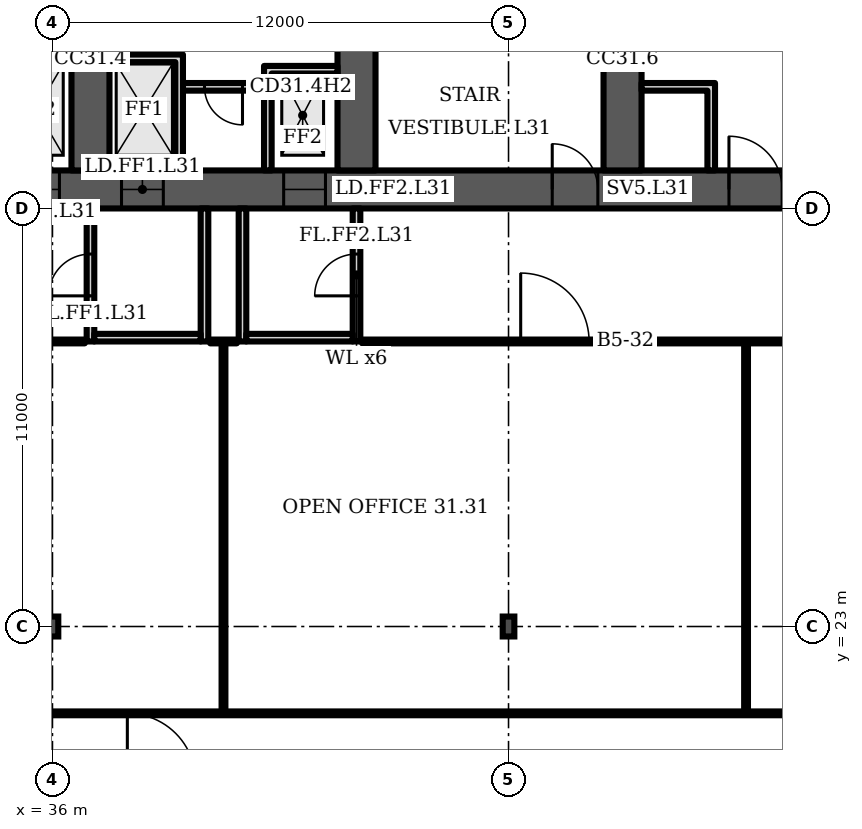
"""IFC4 building model, lengths in metres.
Left out: names, types, materials, properties, quantities, classifications, styles, units other than length and angle.
Written with IfcOpenShell. Run it as: python <this file> out.ifc"""

import sys

from ifc_helpers import new_model, si_unit, direction, frame, frame_2d, origin, origin_2d, place, context, subcontext, project, spatial, polyline, rectangle, i_section, outline, extrude, element, fill, save


model = new_model("IFC4")
c1 = context("Model", 3, precision=1e-05, world=origin(), true_north=direction((0.0, 1.0)))
c2 = subcontext(c1, "Body", "Model", "MODEL_VIEW")
j1 = project(units=[si_unit("LENGTHUNIT", "METRE"), si_unit("PLANEANGLEUNIT", "RADIAN")], contexts=[c1])
p1 = place(None, origin())
s1 = spatial("IfcSite", under=j1, at=p1, CompositionType="ELEMENT")
p2 = place(p1, origin())
s2 = spatial("IfcBuilding", under=s1, at=p2, CompositionType="ELEMENT")
p3 = place(p2, frame((0.0, 0.0, 132.7)))
s3 = spatial("IfcBuildingStorey", under=s2, at=p3, CompositionType="ELEMENT", Elevation=132.7)
p4 = place(p3, frame((16.0, 34.5, 0.0), z_axis=(0.0, 0.0, 1.0), x_axis=(1.0, 0.0, 0.0)))
e1 = element("IfcWall", 1, at=p4, inside=s3, PredefinedType="SHEAR", context=c2, shape_type="SweptSolid", body=[
    extrude(rectangle(XDim=49.0, YDim=1.0, at=frame_2d((24.5, 0.0))), origin(), (0.0, 0.0, 1.0), 3.6),
])
p5 = place(p4, frame((1.2, 0.0, 0.0)))
e2 = element("IfcOpeningElement", 2, at=p5, cuts=e1, PredefinedType="OPENING", context=c2, shape_type="SweptSolid", body=[
    extrude(rectangle(XDim=1.1, YDim=2.1, at=frame_2d((0.55, 1.05))), frame((0.0, 0.51, 0.0), z_axis=(0.0, -1.0, 0.0), x_axis=(1.0, 0.0, 0.0)), (0.0, 0.0, 1.0), 1.02),
])
p6 = place(p4, frame((5.083, 0.0, 0.0)))
e3 = element("IfcOpeningElement", 3, at=p6, cuts=e1, PredefinedType="OPENING", context=c2, shape_type="SweptSolid", body=[
    extrude(rectangle(XDim=1.1, YDim=2.1, at=frame_2d((0.55, 1.05))), frame((0.0, 0.51, 0.0), z_axis=(0.0, -1.0, 0.0), x_axis=(1.0, 0.0, 0.0)), (0.0, 0.0, 1.0), 1.02),
])
p7 = place(p4, frame((2.933, 0.0, 0.0)))
e4 = element("IfcOpeningElement", 4, at=p7, cuts=e1, PredefinedType="OPENING", context=c2, shape_type="SweptSolid", body=[
    extrude(rectangle(XDim=1.4, YDim=2.1, at=frame_2d((0.7, 1.05))), frame((0.0, 0.51, 0.0), z_axis=(0.0, -1.0, 0.0), x_axis=(1.0, 0.0, 0.0)), (0.0, 0.0, 1.0), 1.02),
])
p8 = place(p4, frame((7.65, 0.0, 0.0)))
e5 = element("IfcOpeningElement", 5, at=p8, cuts=e1, PredefinedType="OPENING", context=c2, shape_type="SweptSolid", body=[
    extrude(rectangle(XDim=1.2, YDim=2.1, at=frame_2d((0.6, 1.05))), frame((0.0, 0.51, 0.0), z_axis=(0.0, -1.0, 0.0), x_axis=(1.0, 0.0, 0.0)), (0.0, 0.0, 1.0), 1.02),
])
p9 = place(p4, frame((14.817, 0.0, 0.0)))
e6 = element("IfcOpeningElement", 6, at=p9, cuts=e1, PredefinedType="OPENING", context=c2, shape_type="SweptSolid", body=[
    extrude(rectangle(XDim=1.1, YDim=2.1, at=frame_2d((0.55, 1.05))), frame((0.0, 0.51, 0.0), z_axis=(0.0, -1.0, 0.0), x_axis=(1.0, 0.0, 0.0)), (0.0, 0.0, 1.0), 1.02),
])
p10 = place(p4, frame((19.083, 0.0, 0.0)))
e7 = element("IfcOpeningElement", 7, at=p10, cuts=e1, PredefinedType="OPENING", context=c2, shape_type="SweptSolid", body=[
    extrude(rectangle(XDim=1.1, YDim=2.1, at=frame_2d((0.55, 1.05))), frame((0.0, 0.51, 0.0), z_axis=(0.0, -1.0, 0.0), x_axis=(1.0, 0.0, 0.0)), (0.0, 0.0, 1.0), 1.02),
])
p11 = place(p4, frame((16.8, 0.0, 0.0)))
e8 = element("IfcOpeningElement", 8, at=p11, cuts=e1, PredefinedType="OPENING", context=c2, shape_type="SweptSolid", body=[
    extrude(rectangle(XDim=1.4, YDim=2.1, at=frame_2d((0.7, 1.05))), frame((0.0, 0.51, 0.0), z_axis=(0.0, -1.0, 0.0), x_axis=(1.0, 0.0, 0.0)), (0.0, 0.0, 1.0), 1.02),
])
p12 = place(p4, frame((21.817, 0.0, 0.0)))
e9 = element("IfcOpeningElement", 9, at=p12, cuts=e1, PredefinedType="OPENING", context=c2, shape_type="SweptSolid", body=[
    extrude(rectangle(XDim=1.1, YDim=2.1, at=frame_2d((0.55, 1.05))), frame((0.0, 0.51, 0.0), z_axis=(0.0, -1.0, 0.0), x_axis=(1.0, 0.0, 0.0)), (0.0, 0.0, 1.0), 1.02),
])
p13 = place(p4, frame((26.083, 0.0, 0.0)))
e10 = element("IfcOpeningElement", 10, at=p13, cuts=e1, PredefinedType="OPENING", context=c2, shape_type="SweptSolid", body=[
    extrude(rectangle(XDim=1.1, YDim=2.1, at=frame_2d((0.55, 1.05))), frame((0.0, 0.51, 0.0), z_axis=(0.0, -1.0, 0.0), x_axis=(1.0, 0.0, 0.0)), (0.0, 0.0, 1.0), 1.02),
])
p14 = place(p4, frame((33.15, 0.0, 0.0)))
e11 = element("IfcOpeningElement", 11, at=p14, cuts=e1, PredefinedType="OPENING", context=c2, shape_type="SweptSolid", body=[
    extrude(rectangle(XDim=1.2, YDim=2.1, at=frame_2d((0.6, 1.05))), frame((0.0, 0.51, 0.0), z_axis=(0.0, -1.0, 0.0), x_axis=(1.0, 0.0, 0.0)), (0.0, 0.0, 1.0), 1.02),
])
p15 = place(p4, frame((37.8, 0.0, 0.0)))
e12 = element("IfcOpeningElement", 12, at=p15, cuts=e1, PredefinedType="OPENING", context=c2, shape_type="SweptSolid", body=[
    extrude(rectangle(XDim=1.4, YDim=2.1, at=frame_2d((0.7, 1.05))), frame((0.0, 0.51, 0.0), z_axis=(0.0, -1.0, 0.0), x_axis=(1.0, 0.0, 0.0)), (0.0, 0.0, 1.0), 1.02),
])
p16 = place(p4, frame((42.817, 0.0, 0.0)))
e13 = element("IfcOpeningElement", 13, at=p16, cuts=e1, PredefinedType="OPENING", context=c2, shape_type="SweptSolid", body=[
    extrude(rectangle(XDim=1.1, YDim=2.1, at=frame_2d((0.55, 1.05))), frame((0.0, 0.51, 0.0), z_axis=(0.0, -1.0, 0.0), x_axis=(1.0, 0.0, 0.0)), (0.0, 0.0, 1.0), 1.02),
])
p17 = place(p4, frame((46.7, 0.0, 0.0)))
e14 = element("IfcOpeningElement", 14, at=p17, cuts=e1, PredefinedType="OPENING", context=c2, shape_type="SweptSolid", body=[
    extrude(rectangle(XDim=1.1, YDim=2.1, at=frame_2d((0.55, 1.05))), frame((0.0, 0.51, 0.0), z_axis=(0.0, -1.0, 0.0), x_axis=(1.0, 0.0, 0.0)), (0.0, 0.0, 1.0), 1.02),
])
p18 = place(p4, frame((44.667, 0.0, 0.0)))
e15 = element("IfcOpeningElement", 15, at=p18, cuts=e1, PredefinedType="OPENING", context=c2, shape_type="SweptSolid", body=[
    extrude(rectangle(XDim=1.4, YDim=2.1, at=frame_2d((0.7, 1.05))), frame((0.0, 0.51, 0.0), z_axis=(0.0, -1.0, 0.0), x_axis=(1.0, 0.0, 0.0)), (0.0, 0.0, 1.0), 1.02),
])
p19 = place(p3, frame((37.0, 35.0, 0.0), z_axis=(0.0, 0.0, 1.0), x_axis=(0.0, 1.0, 0.0)))
e16 = element("IfcWall", 16, at=p19, inside=s3, PredefinedType="SHEAR", context=c2, shape_type="SweptSolid", body=[
    extrude(rectangle(XDim=14.577, YDim=1.0, at=frame_2d((7.289, 0.0))), origin(), (0.0, 0.0, 1.0), 3.6),
])
p20 = place(p19, frame((3.4, 0.0, 0.0)))
e17 = element("IfcOpeningElement", 17, at=p20, cuts=e16, PredefinedType="OPENING", context=c2, shape_type="SweptSolid", body=[
    extrude(rectangle(XDim=1.1, YDim=2.1, at=frame_2d((0.55, 1.05))), frame((0.0, 0.51, 0.0), z_axis=(0.0, -1.0, 0.0), x_axis=(1.0, 0.0, 0.0)), (0.0, 0.0, 1.0), 1.02),
])
p21 = place(p19, frame((9.8, 0.0, 0.0)))
e18 = element("IfcOpeningElement", 18, at=p21, cuts=e16, PredefinedType="OPENING", context=c2, shape_type="SweptSolid", body=[
    extrude(rectangle(XDim=1.0, YDim=2.1, at=frame_2d((0.5, 1.05))), frame((0.0, 0.51, 0.0), z_axis=(0.0, -1.0, 0.0), x_axis=(1.0, 0.0, 0.0)), (0.0, 0.0, 1.0), 1.02),
])
p22 = place(p3, frame((44.0, 35.0, 0.0), z_axis=(0.0, 0.0, 1.0), x_axis=(0.0, 1.0, 0.0)))
e19 = element("IfcWall", 19, at=p22, inside=s3, PredefinedType="SHEAR", context=c2, shape_type="SweptSolid", body=[
    extrude(rectangle(XDim=14.577, YDim=1.0, at=frame_2d((7.289, 0.0))), origin(), (0.0, 0.0, 1.0), 3.6),
])
p23 = place(p22, frame((3.4, 0.0, 0.0)))
e20 = element("IfcOpeningElement", 20, at=p23, cuts=e19, PredefinedType="OPENING", context=c2, shape_type="SweptSolid", body=[
    extrude(rectangle(XDim=1.1, YDim=2.1, at=frame_2d((0.55, 1.05))), frame((0.0, 0.51, 0.0), z_axis=(0.0, -1.0, 0.0), x_axis=(1.0, 0.0, 0.0)), (0.0, 0.0, 1.0), 1.02),
])
p24 = place(p22, frame((9.8, 0.0, 0.0)))
e21 = element("IfcOpeningElement", 21, at=p24, cuts=e19, PredefinedType="OPENING", context=c2, shape_type="SweptSolid", body=[
    extrude(rectangle(XDim=1.0, YDim=2.1, at=frame_2d((0.5, 1.05))), frame((0.0, 0.51, 0.0), z_axis=(0.0, -1.0, 0.0), x_axis=(1.0, 0.0, 0.0)), (0.0, 0.0, 1.0), 1.02),
])
p25 = place(p3, frame((51.0, 35.0, 0.0), z_axis=(0.0, 0.0, 1.0), x_axis=(0.0, 1.0, 0.0)))
e22 = element("IfcWall", 22, at=p25, inside=s3, PredefinedType="SHEAR", context=c2, shape_type="SweptSolid", body=[
    extrude(rectangle(XDim=13.965, YDim=1.0, at=frame_2d((6.982, 0.0))), origin(), (0.0, 0.0, 1.0), 3.6),
])
p26 = place(p25, frame((3.4, 0.0, 0.0)))
e23 = element("IfcOpeningElement", 23, at=p26, cuts=e22, PredefinedType="OPENING", context=c2, shape_type="SweptSolid", body=[
    extrude(rectangle(XDim=1.1, YDim=2.1, at=frame_2d((0.55, 1.05))), frame((0.0, 0.51, 0.0), z_axis=(0.0, -1.0, 0.0), x_axis=(1.0, 0.0, 0.0)), (0.0, 0.0, 1.0), 1.02),
])
for number, where, z_axis, x_axis in (
    (24, (36.0, 23.0, 0.0), (0.0, 0.0, 1.0), (1.0, 0.0, 0.0)),
    (25, (48.0, 23.0, 0.0), (0.0, 0.0, 1.0), (1.0, 0.0, 0.0)),
):
    element("IfcColumn", number, at=place(p3, frame(where, z_axis=z_axis, x_axis=x_axis)), inside=s3, PredefinedType="COLUMN", context=c2, shape_type="SweptSolid", body=[
        extrude(i_section(OverallWidth=0.306, OverallDepth=0.524, WebThickness=0.021, FlangeThickness=0.04, FilletRadius=0.027, at=origin_2d()), origin(), (0.0, 0.0, 1.0), 3.6),
    ])
p27 = place(p3, frame((0.0, 0.0, -0.0)))
e26 = element("IfcWall", 26, at=p27, inside=s3, PredefinedType="PARTITIONING", context=c2, shape_type="SweptSolid", body=[
    extrude(outline(polyline([(34.567, 38.05), (34.767, 38.05), (36.5, 38.05), (36.5, 37.85), (34.767, 37.85), (34.767, 35.0), (34.567, 35.0), (34.567, 38.05)])), origin(), (0.0, 0.0, 1.0), 3.2),
])
p28 = place(p3, frame((39.433, 37.2, 0.0), z_axis=(0.0, 0.0, 1.0), x_axis=(1.0, 0.0, 0.0)))
e27 = element("IfcWall", 27, at=p28, inside=s3, PredefinedType="PARTITIONING", context=c2, shape_type="SweptSolid", body=[
    extrude(rectangle(XDim=2.133, YDim=0.2, at=frame_2d((1.067, 0.0))), origin(), (0.0, 0.0, 1.0), 3.2),
])
p29 = place(p28, frame((0.567, 0.0, 0.0)))
e28 = element("IfcOpeningElement", 28, at=p29, cuts=e27, PredefinedType="OPENING", context=c2, shape_type="SweptSolid", body=[
    extrude(rectangle(XDim=1.0, YDim=2.1, at=frame_2d((0.5, 1.05))), frame((0.0, 0.11, 0.0), z_axis=(0.0, -1.0, 0.0), x_axis=(1.0, 0.0, 0.0)), (0.0, 0.0, 1.0), 0.22),
])
p30 = place(p3, frame((0.0, 0.0, -0.0)))
e29 = element("IfcWall", 29, at=p30, inside=s3, PredefinedType="PARTITIONING", context=c2, shape_type="SweptSolid", body=[
    extrude(outline(polyline([(41.567, 37.75), (41.767, 37.75), (43.5, 37.75), (43.5, 37.55), (41.767, 37.55), (41.767, 35.0), (41.567, 35.0), (41.567, 37.75)])), origin(), (0.0, 0.0, 1.0), 3.2),
])
p31 = place(p3, frame((0.0, 0.0, -0.0)))
e30 = element("IfcWall", 30, at=p31, inside=s3, PredefinedType="PARTITIONING", context=c2, shape_type="SweptSolid", body=[
    extrude(outline(polyline([(39.233, 37.85), (37.5, 37.85), (37.5, 38.05), (39.233, 38.05), (39.433, 38.05), (39.433, 35.0), (39.233, 35.0), (39.233, 37.85)])), origin(), (0.0, 0.0, 1.0), 3.2),
])
p32 = place(p3, frame((0.0, 0.0, -0.0)))
e31 = element("IfcWall", 31, at=p32, inside=s3, PredefinedType="PARTITIONING", context=c2, shape_type="SweptSolid", body=[
    extrude(outline(polyline([(53.233, 37.1), (51.5, 37.1), (51.5, 37.3), (53.233, 37.3), (53.433, 37.3), (53.433, 35.0), (53.233, 35.0), (53.233, 37.1)])), origin(), (0.0, 0.0, 1.0), 3.2),
])
p33 = place(p3, frame((37.0, 30.5, 0.0), z_axis=(0.0, 0.0, 1.0), x_axis=(0.0, 1.0, 0.0)))
e32 = element("IfcWall", 32, at=p33, inside=s3, PredefinedType="PARTITIONING", context=c2, shape_type="SweptSolid", body=[
    extrude(rectangle(XDim=3.5, YDim=0.2, at=frame_2d((1.75, 0.0))), origin(), (0.0, 0.0, 1.0), 3.2),
])
p34 = place(p33, frame((1.2, 0.0, 0.0)))
e33 = element("IfcOpeningElement", 33, at=p34, cuts=e32, PredefinedType="OPENING", context=c2, shape_type="SweptSolid", body=[
    extrude(rectangle(XDim=1.1, YDim=2.1, at=frame_2d((0.55, 1.05))), frame((0.0, 0.11, 0.0), z_axis=(0.0, -1.0, 0.0), x_axis=(1.0, 0.0, 0.0)), (0.0, 0.0, 1.0), 0.22),
])
p35 = place(p3, frame((40.0, 30.5, 0.0), z_axis=(0.0, 0.0, 1.0), x_axis=(0.0, 1.0, 0.0)))
e34 = element("IfcWall", 34, at=p35, inside=s3, PredefinedType="PARTITIONING", context=c2, shape_type="SweptSolid", body=[
    extrude(rectangle(XDim=3.5, YDim=0.2, at=frame_2d((1.75, 0.0))), origin(), (0.0, 0.0, 1.0), 3.2),
])
p36 = place(p3, frame((37.1, 30.6, 0.0), z_axis=(0.0, 0.0, 1.0), x_axis=(1.0, 0.0, 0.0)))
e35 = element("IfcWall", 35, at=p36, inside=s3, PredefinedType="PARTITIONING", context=c2, shape_type="SweptSolid", body=[
    extrude(rectangle(XDim=2.8, YDim=0.2, at=frame_2d((1.4, 0.0))), origin(), (0.0, 0.0, 1.0), 3.2),
])
p37 = place(p3, frame((41.0, 30.5, 0.0), z_axis=(0.0, 0.0, 1.0), x_axis=(0.0, 1.0, 0.0)))
e36 = element("IfcWall", 36, at=p37, inside=s3, PredefinedType="PARTITIONING", context=c2, shape_type="SweptSolid", body=[
    extrude(rectangle(XDim=3.5, YDim=0.2, at=frame_2d((1.75, 0.0))), origin(), (0.0, 0.0, 1.0), 3.2),
])
p38 = place(p3, frame((44.0, 30.5, 0.0), z_axis=(0.0, 0.0, 1.0), x_axis=(0.0, 1.0, 0.0)))
e37 = element("IfcWall", 37, at=p38, inside=s3, PredefinedType="PARTITIONING", context=c2, shape_type="SweptSolid", body=[
    extrude(rectangle(XDim=3.5, YDim=0.2, at=frame_2d((1.75, 0.0))), origin(), (0.0, 0.0, 1.0), 3.2),
])
p39 = place(p38, frame((1.2, 0.0, 0.0)))
e38 = element("IfcOpeningElement", 38, at=p39, cuts=e37, PredefinedType="OPENING", context=c2, shape_type="SweptSolid", body=[
    extrude(rectangle(XDim=1.1, YDim=2.1, at=frame_2d((0.55, 1.05))), frame((0.0, 0.11, 0.0), z_axis=(0.0, -1.0, 0.0), x_axis=(1.0, 0.0, 0.0)), (0.0, 0.0, 1.0), 0.22),
])
p40 = place(p3, frame((41.1, 30.6, 0.0), z_axis=(0.0, 0.0, 1.0), x_axis=(1.0, 0.0, 0.0)))
e39 = element("IfcWall", 39, at=p40, inside=s3, PredefinedType="PARTITIONING", context=c2, shape_type="SweptSolid", body=[
    extrude(rectangle(XDim=2.8, YDim=0.2, at=frame_2d((1.4, 0.0))), origin(), (0.0, 0.0, 1.0), 3.2),
])
p41 = place(p3, frame((18.2, 30.5, 0.0), z_axis=(0.0, 0.0, 1.0), x_axis=(1.0, 0.0, 0.0)))
e40 = element("IfcWall", 40, at=p41, inside=s3, PredefinedType="PARTITIONING", context=c2, shape_type="SweptSolid", body=[
    extrude(rectangle(XDim=18.65, YDim=0.1, at=frame_2d((9.325, 0.0))), origin(), (0.0, 0.0, 1.0), 3.2),
])
p42 = place(p41, frame((1.33, 0.0, 0.0)))
e41 = element("IfcOpeningElement", 41, at=p42, cuts=e40, PredefinedType="OPENING", context=c2, shape_type="SweptSolid", body=[
    extrude(rectangle(XDim=1.0, YDim=2.1, at=frame_2d((0.5, 1.05))), frame((0.0, 0.06, 0.0), z_axis=(0.0, -1.0, 0.0), x_axis=(1.0, 0.0, 0.0)), (0.0, 0.0, 1.0), 0.12),
])
p43 = place(p41, frame((13.17, 0.0, 0.0)))
e42 = element("IfcOpeningElement", 42, at=p43, cuts=e40, PredefinedType="OPENING", context=c2, shape_type="SweptSolid", body=[
    extrude(rectangle(XDim=1.0, YDim=2.1, at=frame_2d((0.5, 1.05))), frame((0.0, 0.06, 0.0), z_axis=(0.0, -1.0, 0.0), x_axis=(1.0, 0.0, 0.0)), (0.0, 0.0, 1.0), 0.12),
])
p44 = place(p3, frame((18.505, 20.715, 0.0), z_axis=(0.0, 0.0, 1.0), x_axis=(1.0, 0.0, 0.0)))
e43 = element("IfcWall", 43, at=p44, inside=s3, PredefinedType="PARTITIONING", context=c2, shape_type="SweptSolid", body=[
    extrude(rectangle(XDim=49.385, YDim=0.1, at=frame_2d((24.692, 0.0))), origin(), (0.0, 0.0, 1.0), 3.2),
])
p45 = place(p44, frame((1.025, 0.0, 0.0)))
e44 = element("IfcOpeningElement", 44, at=p45, cuts=e43, PredefinedType="OPENING", context=c2, shape_type="SweptSolid", body=[
    extrude(rectangle(XDim=1.0, YDim=2.1, at=frame_2d((0.5, 1.05))), frame((0.0, 0.06, 0.0), z_axis=(0.0, -1.0, 0.0), x_axis=(1.0, 0.0, 0.0)), (0.0, 0.0, 1.0), 0.12),
])
for number, where, z_axis, x_axis in (
    (45, (40.5, 20.715, 0.0), (0.0, 0.0, 1.0), (0.0, 1.0, 0.0)),
    (46, (54.25, 20.715, 0.0), (0.0, 0.0, 1.0), (0.0, 1.0, 0.0)),
):
    element("IfcWall", number, at=place(p3, frame(where, z_axis=z_axis, x_axis=x_axis)), inside=s3, PredefinedType="PARTITIONING", context=c2, shape_type="SweptSolid", body=[
        extrude(rectangle(XDim=9.785, YDim=0.1, at=frame_2d((4.893, 0.0))), origin(), (0.0, 0.0, 1.0), 3.2),
    ])
p46 = place(p3, frame((40.15, 30.5, 0.0), z_axis=(0.0, 0.0, 1.0), x_axis=(1.0, 0.0, 0.0)))
e47 = element("IfcWall", 47, at=p46, inside=s3, PredefinedType="PARTITIONING", context=c2, shape_type="SweptSolid", body=[
    extrude(rectangle(XDim=0.7, YDim=0.1, at=frame_2d((0.35, 0.0))), origin(), (0.0, 0.0, 1.0), 3.2),
])
p47 = place(p3, frame((44.15, 30.5, 0.0), z_axis=(0.0, 0.0, 1.0), x_axis=(1.0, 0.0, 0.0)))
e48 = element("IfcWall", 48, at=p47, inside=s3, PredefinedType="PARTITIONING", context=c2, shape_type="SweptSolid", body=[
    extrude(rectangle(XDim=20.85, YDim=0.1, at=frame_2d((10.425, 0.0))), origin(), (0.0, 0.0, 1.0), 3.2),
])
p48 = place(p47, frame((4.17, 0.0, 0.0)))
e49 = element("IfcOpeningElement", 49, at=p48, cuts=e48, PredefinedType="OPENING", context=c2, shape_type="SweptSolid", body=[
    extrude(rectangle(XDim=1.8, YDim=2.1, at=frame_2d((0.9, 1.05))), frame((0.0, 0.06, 0.0), z_axis=(0.0, -1.0, 0.0), x_axis=(1.0, 0.0, 0.0)), (0.0, 0.0, 1.0), 0.12),
])
p49 = place(p47, frame((16.72, 0.0, 0.0)))
e50 = element("IfcOpeningElement", 50, at=p49, cuts=e48, PredefinedType="OPENING", context=c2, shape_type="SweptSolid", body=[
    extrude(rectangle(XDim=1.0, YDim=2.1, at=frame_2d((0.5, 1.05))), frame((0.0, 0.06, 0.0), z_axis=(0.0, -1.0, 0.0), x_axis=(1.0, 0.0, 0.0)), (0.0, 0.0, 1.0), 0.12),
])
p50 = place(p10, origin())
e51 = element("IfcDoor", 51, at=p50, inside=s3, OperationType="DOUBLE_DOOR_SLIDING", PredefinedType="DOOR", context=c2, shape_type="SweptSolid", body=[
    extrude(rectangle(XDim=1.1, YDim=2.1, at=frame_2d((0.55, 1.05))), frame((0.0, 0.025, 0.0), z_axis=(0.0, -1.0, 0.0), x_axis=(1.0, 0.0, 0.0)), (0.0, 0.0, 1.0), 0.05),
])
fill(e7, e51)
p51 = place(p29, origin())
e52 = element("IfcDoor", 52, at=p51, inside=s3, OperationType="SINGLE_SWING_RIGHT", PredefinedType="DOOR", context=c2, shape_type="SweptSolid", body=[
    extrude(rectangle(XDim=1.0, YDim=2.1, at=frame_2d((0.5, 1.05))), frame((0.0, 0.025, 0.0), z_axis=(0.0, -1.0, 0.0), x_axis=(1.0, 0.0, 0.0)), (0.0, 0.0, 1.0), 0.05),
])
fill(e28, e52)
p52 = place(p12, origin())
e53 = element("IfcDoor", 53, at=p52, inside=s3, OperationType="DOUBLE_DOOR_SLIDING", PredefinedType="DOOR", context=c2, shape_type="SweptSolid", body=[
    extrude(rectangle(XDim=1.1, YDim=2.1, at=frame_2d((0.55, 1.05))), frame((0.0, 0.025, 0.0), z_axis=(0.0, -1.0, 0.0), x_axis=(1.0, 0.0, 0.0)), (0.0, 0.0, 1.0), 0.05),
])
fill(e9, e53)
p53 = place(p13, origin())
e54 = element("IfcDoor", 54, at=p53, inside=s3, OperationType="DOUBLE_DOOR_SLIDING", PredefinedType="DOOR", context=c2, shape_type="SweptSolid", body=[
    extrude(rectangle(XDim=1.1, YDim=2.1, at=frame_2d((0.55, 1.05))), frame((0.0, 0.025, 0.0), z_axis=(0.0, -1.0, 0.0), x_axis=(1.0, 0.0, 0.0)), (0.0, 0.0, 1.0), 0.05),
])
fill(e10, e54)
p54 = place(p14, origin())
e55 = element("IfcDoor", 55, at=p54, inside=s3, OperationType="SINGLE_SWING_LEFT", PredefinedType="DOOR", context=c2, shape_type="SweptSolid", body=[
    extrude(rectangle(XDim=1.2, YDim=2.1, at=frame_2d((0.6, 1.05))), frame((0.0, 0.025, 0.0), z_axis=(0.0, -1.0, 0.0), x_axis=(1.0, 0.0, 0.0)), (0.0, 0.0, 1.0), 0.05),
])
fill(e11, e55)
p55 = place(p15, origin())
e56 = element("IfcDoor", 56, at=p55, inside=s3, OperationType="DOUBLE_DOOR_SINGLE_SWING", PredefinedType="DOOR", context=c2, shape_type="SweptSolid", body=[
    extrude(rectangle(XDim=1.4, YDim=2.1, at=frame_2d((0.7, 1.05))), frame((0.0, 0.025, 0.0), z_axis=(0.0, -1.0, 0.0), x_axis=(1.0, 0.0, 0.0)), (0.0, 0.0, 1.0), 0.05),
])
fill(e12, e56)
p56 = place(p34, origin())
e57 = element("IfcDoor", 57, at=p56, inside=s3, OperationType="SINGLE_SWING_LEFT", PredefinedType="DOOR", context=c2, shape_type="SweptSolid", body=[
    extrude(rectangle(XDim=1.1, YDim=2.1, at=frame_2d((0.55, 1.05))), frame((0.0, 0.025, 0.0), z_axis=(0.0, -1.0, 0.0), x_axis=(1.0, 0.0, 0.0)), (0.0, 0.0, 1.0), 0.05),
])
fill(e33, e57)
p57 = place(p39, origin())
e58 = element("IfcDoor", 58, at=p57, inside=s3, OperationType="SINGLE_SWING_LEFT", PredefinedType="DOOR", context=c2, shape_type="SweptSolid", body=[
    extrude(rectangle(XDim=1.1, YDim=2.1, at=frame_2d((0.55, 1.05))), frame((0.0, 0.025, 0.0), z_axis=(0.0, -1.0, 0.0), x_axis=(1.0, 0.0, 0.0)), (0.0, 0.0, 1.0), 0.05),
])
fill(e38, e58)
p58 = place(p48, origin())
e59 = element("IfcDoor", 59, at=p58, inside=s3, OperationType="DOUBLE_DOOR_SINGLE_SWING", PredefinedType="DOOR", context=c2, shape_type="SweptSolid", body=[
    extrude(rectangle(XDim=1.8, YDim=2.1, at=frame_2d((0.9, 1.05))), frame((0.0, 0.025, 0.0), z_axis=(0.0, -1.0, 0.0), x_axis=(1.0, 0.0, 0.0)), (0.0, 0.0, 1.0), 0.05),
])
fill(e49, e59)
save(model, sys.argv[1])
